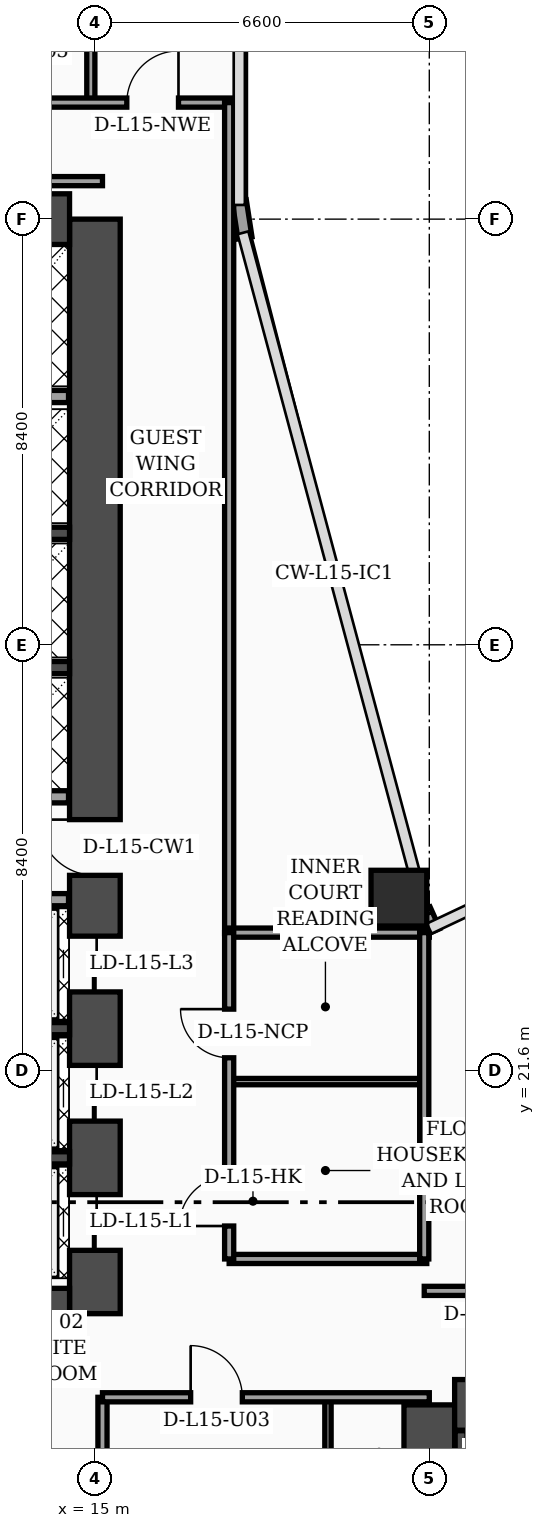
"""IFC4 building model, lengths in metres.
Left out: names, types, materials, properties, quantities, classifications, styles, units other than length and angle.
Written with IfcOpenShell. Run it as: python <this file> out.ifc"""

import sys

from ifc_helpers import new_model, si_unit, direction, frame, frame_2d, origin, origin_2d, place, context, subcontext, project, spatial, rectangle, hollow_rectangle, extrude, element, fill, save


model = new_model("IFC4")
c1 = context("Model", 3, precision=1e-05, world=origin(), true_north=direction((0.0, 1.0)))
c2 = subcontext(c1, "Body", "Model", "MODEL_VIEW")
j1 = project(units=[si_unit("LENGTHUNIT", "METRE"), si_unit("PLANEANGLEUNIT", "RADIAN")], contexts=[c1])
p1 = place(None, origin())
s1 = spatial("IfcSite", under=j1, at=p1, CompositionType="ELEMENT")
p2 = place(p1, origin())
s2 = spatial("IfcBuilding", under=s1, at=p2, CompositionType="ELEMENT")
p3 = place(p2, frame((0.0, 0.0, 66.0)))
s3 = spatial("IfcBuildingStorey", under=s2, at=p3, CompositionType="ELEMENT", Elevation=66.0)
p4 = place(p3, frame((15.0, 16.8, 0.0), z_axis=(0.0, 0.0, 1.0), x_axis=(0.0, 1.0, 0.0)))
e1 = element("IfcWall", 1, at=p4, inside=s3, PredefinedType="SHEAR", context=c2, shape_type="SweptSolid", body=[
    extrude(rectangle(XDim=21.6, YDim=1.0, at=frame_2d((10.8, 0.0))), origin(), (0.0, 0.0, 1.0), 3.56),
])
p5 = place(p4, frame((8.65, 0.0, 0.0)))
e2 = element("IfcOpeningElement", 2, at=p5, cuts=e1, PredefinedType="OPENING", context=c2, shape_type="SweptSolid", body=[
    extrude(rectangle(XDim=1.1, YDim=2.2, at=frame_2d((0.55, 1.1))), frame((0.0, 0.51, 0.0), z_axis=(0.0, -1.0, 0.0), x_axis=(1.0, 0.0, 0.0)), (0.0, 0.0, 1.0), 1.02),
])
p6 = place(p4, frame((1.25, 0.0, 0.0)))
e3 = element("IfcOpeningElement", 3, at=p6, cuts=e1, PredefinedType="OPENING", context=c2, shape_type="SweptSolid", body=[
    extrude(rectangle(XDim=1.1, YDim=2.2, at=frame_2d((0.55, 1.1))), frame((0.0, 0.51, 0.0), z_axis=(0.0, -1.0, 0.0), x_axis=(1.0, 0.0, 0.0)), (0.0, 0.0, 1.0), 1.02),
])
p7 = place(p4, frame((3.8, 0.0, 0.0)))
e4 = element("IfcOpeningElement", 4, at=p7, cuts=e1, PredefinedType="OPENING", context=c2, shape_type="SweptSolid", body=[
    extrude(rectangle(XDim=1.1, YDim=2.2, at=frame_2d((0.55, 1.1))), frame((0.0, 0.51, 0.0), z_axis=(0.0, -1.0, 0.0), x_axis=(1.0, 0.0, 0.0)), (0.0, 0.0, 1.0), 1.02),
])
p8 = place(p4, frame((6.35, 0.0, 0.0)))
e5 = element("IfcOpeningElement", 5, at=p8, cuts=e1, PredefinedType="OPENING", context=c2, shape_type="SweptSolid", body=[
    extrude(rectangle(XDim=1.1, YDim=2.2, at=frame_2d((0.55, 1.1))), frame((0.0, 0.51, 0.0), z_axis=(0.0, -1.0, 0.0), x_axis=(1.0, 0.0, 0.0)), (0.0, 0.0, 1.0), 1.02),
])
for number, where, z_axis, x_axis in (
    (6, (4.7, 38.4, 0.0), (0.0, 0.0, 1.0), (1.0, 0.0, 0.0)),
    (7, (4.7, 16.8, 0.0), (0.0, 0.0, 1.0), (1.0, 0.0, 0.0)),
):
    element("IfcWall", number, at=place(p3, frame(where, z_axis=z_axis, x_axis=x_axis)), inside=s3, PredefinedType="SHEAR", context=c2, shape_type="SweptSolid", body=[
        extrude(rectangle(XDim=9.8, YDim=1.0, at=frame_2d((4.9, 0.0))), origin(), (0.0, 0.0, 1.0), 3.56),
    ])
p9 = place(p3, frame((21.6, 4.6, 0.0), z_axis=(0.0, 0.0, 1.0), x_axis=(0.0, 1.0, 0.0)))
e8 = element("IfcWall", 8, at=p9, inside=s3, PredefinedType="SHEAR", context=c2, shape_type="SweptSolid", body=[
    extrude(rectangle(XDim=10.4, YDim=1.0, at=frame_2d((5.2, 0.0))), origin(), (0.0, 0.0, 1.0), 3.56),
])
p10 = place(p3, frame((22.1, 15.0, 0.0), z_axis=(0.0, 0.0, 1.0), x_axis=(1.0, 0.0, 0.0)))
e9 = element("IfcWall", 9, at=p10, inside=s3, PredefinedType="SHEAR", context=c2, shape_type="SweptSolid", body=[
    extrude(rectangle(XDim=9.8, YDim=1.0, at=frame_2d((4.9, 0.0))), origin(), (0.0, 0.0, 1.0), 3.56),
])
p11 = place(p10, frame((4.8, 0.0, 0.0)))
e10 = element("IfcOpeningElement", 10, at=p11, cuts=e9, PredefinedType="OPENING", context=c2, shape_type="SweptSolid", body=[
    extrude(rectangle(XDim=1.1, YDim=2.2, at=frame_2d((0.55, 1.1))), frame((0.0, 0.51, 0.0), z_axis=(0.0, -1.0, 0.0), x_axis=(1.0, 0.0, 0.0)), (0.0, 0.0, 1.0), 1.02),
])
p12 = place(p3, frame((22.23, 5.1, 0.0), z_axis=(0.0, 0.0, 1.0), x_axis=(0.0, 1.0, 0.0)))
e11 = element("IfcWall", 11, at=p12, inside=s3, PredefinedType="SOLIDWALL", context=c2, shape_type="SweptSolid", body=[
    extrude(rectangle(XDim=9.39, YDim=0.24, at=frame_2d((4.695, 0.0))), origin(), (0.0, 0.0, 1.0), 3.56),
])
for number, where, z_axis, x_axis in (
    (12, (12.18, 19.875, 0.0), (0.0, 0.0, 1.0), (1.0, 0.0, 0.0)),
    (13, (12.18, 22.425, 0.0), (0.0, 0.0, 1.0), (1.0, 0.0, 0.0)),
    (14, (12.18, 29.55, 0.0), (0.0, 0.0, 1.0), (1.0, 0.0, 0.0)),
    (15, (12.18, 32.2, 0.0), (0.0, 0.0, 1.0), (1.0, 0.0, 0.0)),
):
    element("IfcWall", number, at=place(p3, frame(where, z_axis=z_axis, x_axis=x_axis)), inside=s3, PredefinedType="SOLIDWALL", context=c2, shape_type="SweptSolid", body=[
        extrude(rectangle(XDim=2.32, YDim=0.24, at=frame_2d((1.16, 0.0))), origin(), (0.0, 0.0, 1.0), 3.56),
    ])
p13 = place(p3, frame((21.0, 25.0, 0.0), z_axis=(0.0, 0.0, 1.0), x_axis=(1.0, 0.0, 0.0)))
e16 = element("IfcColumn", 16, at=p13, inside=s3, PredefinedType="COLUMN", context=c2, shape_type="SweptSolid", body=[
    extrude(hollow_rectangle(XDim=1.1, YDim=1.1, WallThickness=0.045, at=origin_2d()), origin(), (0.0, 0.0, 1.0), 3.56),
])
p14 = place(p3, frame((21.68, 24.34, 0.0), z_axis=(0.0, 0.0, 1.0), x_axis=(-0.40758134973, 0.913168901875, 0.0)))
e17 = element("IfcWall", 17, at=p14, inside=s3, PredefinedType="SOLIDWALL", context=c2, shape_type="SweptSolid", body=[
    extrude(rectangle(XDim=0.471, YDim=0.28, at=frame_2d((0.235, 0.0))), origin(), (0.0, 0.0, 1.0), 3.56),
])
p15 = place(p3, frame((17.962, 38.03, 0.0), z_axis=(0.0, 0.0, 1.0), x_axis=(-0.15141125477, 0.988470855377, 0.0)))
e18 = element("IfcWall", 18, at=p15, inside=s3, PredefinedType="SOLIDWALL", context=c2, shape_type="SweptSolid", body=[
    extrude(rectangle(XDim=0.739, YDim=0.28, at=frame_2d((0.369, 0.0))), origin(), (0.0, 0.0, 1.0), 3.56),
])
p16 = place(p3, frame((12.15, 24.97, 0.0), z_axis=(0.0, 0.0, 1.0), x_axis=(1.0, 0.0, 0.0)))
e19 = element("IfcWall", 19, at=p16, inside=s3, PredefinedType="SOLIDWALL", context=c2, shape_type="SweptSolid", body=[
    extrude(rectangle(XDim=2.33, YDim=0.24, at=frame_2d((1.165, 0.0))), origin(), (0.0, 0.0, 1.0), 2.84),
])
p17 = place(p3, frame((12.25, 27.0, 0.0), z_axis=(0.0, 0.0, 1.0), x_axis=(1.0, 0.0, 0.0)))
e20 = element("IfcWall", 20, at=p17, inside=s3, PredefinedType="SOLIDWALL", context=c2, shape_type="SweptSolid", body=[
    extrude(rectangle(XDim=2.23, YDim=0.24, at=frame_2d((1.115, 0.0))), origin(), (0.0, 0.0, 1.0), 3.56),
])
p18 = place(p3, frame((9.66, 34.9, 0.0), z_axis=(0.0, 0.0, 1.0), x_axis=(1.0, 0.0, 0.0)))
e21 = element("IfcWall", 21, at=p18, inside=s3, PredefinedType="SOLIDWALL", context=c2, shape_type="SweptSolid", body=[
    extrude(rectangle(XDim=4.82, YDim=0.24, at=frame_2d((2.41, 0.0))), origin(), (0.0, 0.0, 1.0), 3.56),
])
p19 = place(p3, frame((15.15, 2.44, 0.0), z_axis=(0.0, 0.0, 1.0), x_axis=(0.0, 1.0, 0.0)))
e22 = element("IfcWall", 22, at=p19, inside=s3, PredefinedType="PARTITIONING", context=c2, shape_type="SweptSolid", body=[
    extrude(rectangle(XDim=12.71, YDim=0.18, at=frame_2d((6.355, 0.0))), origin(), (0.0, 0.0, 1.0), 3.04),
])
p20 = place(p3, frame((19.6, 2.44, 0.0), z_axis=(0.0, 0.0, 1.0), x_axis=(0.0, 1.0, 0.0)))
e23 = element("IfcWall", 23, at=p20, inside=s3, PredefinedType="PARTITIONING", context=c2, shape_type="SweptSolid", body=[
    extrude(rectangle(XDim=12.71, YDim=0.125, at=frame_2d((6.355, 0.0))), origin(), (0.0, 0.0, 1.0), 2.34),
])
p21 = place(p20, frame((4.34, 0.0, 0.0)))
e24 = element("IfcOpeningElement", 24, at=p21, cuts=e23, PredefinedType="OPENING", context=c2, shape_type="SweptSolid", body=[
    extrude(rectangle(XDim=0.96, YDim=2.2, at=frame_2d((0.48, 1.1))), frame((0.0, 0.073, 0.0), z_axis=(0.0, -1.0, 0.0), x_axis=(1.0, 0.0, 0.0)), (0.0, 0.0, 1.0), 0.145),
])
p22 = place(p20, frame((10.18, 0.0, 0.0)))
e25 = element("IfcOpeningElement", 25, at=p22, cuts=e23, PredefinedType="OPENING", context=c2, shape_type="SweptSolid", body=[
    extrude(rectangle(XDim=0.9, YDim=2.15, at=frame_2d((0.45, 1.075))), frame((0.0, 0.073, 0.0), z_axis=(0.0, -1.0, 0.0), x_axis=(1.0, 0.0, 0.0)), (0.0, 0.0, 1.0), 0.145),
])
p23 = place(p3, frame((15.15, 15.15, 0.0), z_axis=(0.0, 0.0, 1.0), x_axis=(1.0, 0.0, 0.0)))
e26 = element("IfcWall", 26, at=p23, inside=s3, PredefinedType="PARTITIONING", context=c2, shape_type="SweptSolid", body=[
    extrude(rectangle(XDim=6.45, YDim=0.18, at=frame_2d((3.225, 0.0))), origin(), (0.0, 0.0, 1.0), 2.34),
])
p24 = place(p23, frame((1.74, 0.0, 0.0)))
e27 = element("IfcOpeningElement", 27, at=p24, cuts=e26, PredefinedType="OPENING", context=c2, shape_type="SweptSolid", body=[
    extrude(rectangle(XDim=1.02, YDim=2.2, at=frame_2d((0.51, 1.1))), frame((0.0, 0.1, 0.0), z_axis=(0.0, -1.0, 0.0), x_axis=(1.0, 0.0, 0.0)), (0.0, 0.0, 1.0), 0.2),
])
p25 = place(p3, frame((14.92, 40.7, 0.0), z_axis=(0.0, 0.0, 1.0), x_axis=(0.0, 1.0, 0.0)))
e28 = element("IfcWall", 28, at=p25, inside=s3, PredefinedType="PARTITIONING", context=c2, shape_type="SweptSolid", body=[
    extrude(rectangle(XDim=7.1, YDim=0.16, at=frame_2d((3.55, 0.0))), origin(), (0.0, 0.0, 1.0), 3.04),
])
p26 = place(p3, frame((0.08, 40.7, 0.0), z_axis=(0.0, 0.0, 1.0), x_axis=(1.0, 0.0, 0.0)))
e29 = element("IfcWall", 29, at=p26, inside=s3, PredefinedType="PARTITIONING", context=c2, shape_type="SweptSolid", body=[
    extrude(rectangle(XDim=17.77, YDim=0.18, at=frame_2d((8.885, 0.0))), origin(), (0.0, 0.0, 1.0), 2.84),
])
p27 = place(p26, frame((0.9, 0.0, 0.0)))
e30 = element("IfcOpeningElement", 30, at=p27, cuts=e29, PredefinedType="OPENING", context=c2, shape_type="SweptSolid", body=[
    extrude(rectangle(XDim=1.02, YDim=2.2, at=frame_2d((0.51, 1.1))), frame((0.0, 0.1, 0.0), z_axis=(0.0, -1.0, 0.0), x_axis=(1.0, 0.0, 0.0)), (0.0, 0.0, 1.0), 0.2),
])
p28 = place(p26, frame((4.75, 0.0, 0.0)))
e31 = element("IfcOpeningElement", 31, at=p28, cuts=e29, PredefinedType="OPENING", context=c2, shape_type="SweptSolid", body=[
    extrude(rectangle(XDim=1.02, YDim=2.2, at=frame_2d((0.51, 1.1))), frame((0.0, 0.1, 0.0), z_axis=(0.0, -1.0, 0.0), x_axis=(1.0, 0.0, 0.0)), (0.0, 0.0, 1.0), 0.2),
])
p29 = place(p26, frame((10.63, 0.0, 0.0)))
e32 = element("IfcOpeningElement", 32, at=p29, cuts=e29, PredefinedType="OPENING", context=c2, shape_type="SweptSolid", body=[
    extrude(rectangle(XDim=1.02, YDim=2.2, at=frame_2d((0.51, 1.1))), frame((0.0, 0.1, 0.0), z_axis=(0.0, -1.0, 0.0), x_axis=(1.0, 0.0, 0.0)), (0.0, 0.0, 1.0), 0.2),
])
p30 = place(p26, frame((15.55, 0.0, 0.0)))
e33 = element("IfcOpeningElement", 33, at=p30, cuts=e29, PredefinedType="OPENING", context=c2, shape_type="SweptSolid", body=[
    extrude(rectangle(XDim=1.02, YDim=2.2, at=frame_2d((0.51, 1.1))), frame((0.0, 0.1, 0.0), z_axis=(0.0, -1.0, 0.0), x_axis=(1.0, 0.0, 0.0)), (0.0, 0.0, 1.0), 0.2),
])
p31 = place(p3, frame((17.65, 24.3, 0.0), z_axis=(0.0, 0.0, 1.0), x_axis=(0.0, 1.0, 0.0)))
e34 = element("IfcWall", 34, at=p31, inside=s3, PredefinedType="PARTITIONING", context=c2, shape_type="SweptSolid", body=[
    extrude(rectangle(XDim=16.4, YDim=0.18, at=frame_2d((8.2, 0.0))), origin(), (0.0, 0.0, 1.0), 2.84),
])
p32 = place(p3, frame((3.68, 39.15, 0.0), z_axis=(0.0, 0.0, 1.0), x_axis=(1.0, 0.0, 0.0)))
e35 = element("IfcWall", 35, at=p32, inside=s3, PredefinedType="PARTITIONING", context=c2, shape_type="SweptSolid", body=[
    extrude(rectangle(XDim=11.47, YDim=0.18, at=frame_2d((5.735, 0.0))), origin(), (0.0, 0.0, 1.0), 2.84),
])
p33 = place(p3, frame((17.65, 17.88, 0.0), z_axis=(0.0, 0.0, 1.0), x_axis=(1.0, 0.0, 0.0)))
e36 = element("IfcWall", 36, at=p33, inside=s3, PredefinedType="PARTITIONING", context=c2, shape_type="SweptSolid", body=[
    extrude(rectangle(XDim=3.9, YDim=0.18, at=frame_2d((1.95, 0.0))), origin(), (0.0, 0.0, 1.0), 3.56),
])
p34 = place(p3, frame((17.65, 21.38, 0.0), z_axis=(0.0, 0.0, 1.0), x_axis=(1.0, 0.0, 0.0)))
e37 = element("IfcWall", 37, at=p34, inside=s3, PredefinedType="PARTITIONING", context=c2, shape_type="SweptSolid", body=[
    extrude(rectangle(XDim=3.9, YDim=0.125, at=frame_2d((1.95, 0.0))), origin(), (0.0, 0.0, 1.0), 3.09),
])
p35 = place(p3, frame((17.65, 24.32, 0.0), z_axis=(0.0, 0.0, 1.0), x_axis=(1.0, 0.0, 0.0)))
e38 = element("IfcWall", 38, at=p35, inside=s3, PredefinedType="PARTITIONING", context=c2, shape_type="SweptSolid", body=[
    extrude(rectangle(XDim=3.95, YDim=0.18, at=frame_2d((1.975, 0.0))), origin(), (0.0, 0.0, 1.0), 3.56),
])
p36 = place(p3, frame((21.5, 17.88, 0.0), z_axis=(0.0, 0.0, 1.0), x_axis=(0.0, 1.0, 0.0)))
e39 = element("IfcWall", 39, at=p36, inside=s3, PredefinedType="PARTITIONING", context=c2, shape_type="SweptSolid", body=[
    extrude(rectangle(XDim=6.44, YDim=0.18, at=frame_2d((3.22, 0.0))), origin(), (0.0, 0.0, 1.0), 3.09),
])
p37 = place(p3, frame((17.65, 17.88, 0.0), z_axis=(0.0, 0.0, 1.0), x_axis=(0.0, 1.0, 0.0)))
e40 = element("IfcWall", 40, at=p37, inside=s3, PredefinedType="PARTITIONING", context=c2, shape_type="SweptSolid", body=[
    extrude(rectangle(XDim=6.44, YDim=0.18, at=frame_2d((3.22, 0.0))), origin(), (0.0, 0.0, 1.0), 3.09),
])
p38 = place(p37, frame((0.65, 0.0, 0.0)))
e41 = element("IfcOpeningElement", 41, at=p38, cuts=e40, PredefinedType="OPENING", context=c2, shape_type="SweptSolid", body=[
    extrude(rectangle(XDim=0.98, YDim=2.15, at=frame_2d((0.49, 1.075))), frame((0.0, 0.1, 0.0), z_axis=(0.0, -1.0, 0.0), x_axis=(1.0, 0.0, 0.0)), (0.0, 0.0, 1.0), 0.2),
])
p39 = place(p37, frame((3.97, 0.0, 0.0)))
e42 = element("IfcOpeningElement", 42, at=p39, cuts=e40, PredefinedType="OPENING", context=c2, shape_type="SweptSolid", body=[
    extrude(rectangle(XDim=0.96, YDim=2.2, at=frame_2d((0.48, 1.1))), frame((0.0, 0.1, 0.0), z_axis=(0.0, -1.0, 0.0), x_axis=(1.0, 0.0, 0.0)), (0.0, 0.0, 1.0), 0.2),
])
p40 = place(p3, frame((21.5, 17.25, 0.0), z_axis=(0.0, 0.0, 1.0), x_axis=(1.0, 0.0, 0.0)))
e43 = element("IfcWall", 43, at=p40, inside=s3, PredefinedType="PARTITIONING", context=c2, shape_type="SweptSolid", body=[
    extrude(rectangle(XDim=27.45, YDim=0.18, at=frame_2d((13.725, 0.0))), origin(), (0.0, 0.0, 1.0), 2.84),
])
p41 = place(p40, frame((0.95, 0.0, 0.0)))
e44 = element("IfcOpeningElement", 44, at=p41, cuts=e43, PredefinedType="OPENING", context=c2, shape_type="SweptSolid", body=[
    extrude(rectangle(XDim=1.02, YDim=2.2, at=frame_2d((0.51, 1.1))), frame((0.0, 0.1, 0.0), z_axis=(0.0, -1.0, 0.0), x_axis=(1.0, 0.0, 0.0)), (0.0, 0.0, 1.0), 0.2),
])
p42 = place(p40, frame((15.28, 0.0, 0.0)))
e45 = element("IfcOpeningElement", 45, at=p42, cuts=e43, PredefinedType="OPENING", context=c2, shape_type="SweptSolid", body=[
    extrude(rectangle(XDim=1.02, YDim=2.2, at=frame_2d((0.51, 1.1))), frame((0.0, 0.1, 0.0), z_axis=(0.0, -1.0, 0.0), x_axis=(1.0, 0.0, 0.0)), (0.0, 0.0, 1.0), 0.2),
])
p43 = place(p24, origin())
e46 = element("IfcDoor", 46, at=p43, inside=s3, OperationType="SINGLE_SWING_LEFT", PredefinedType="DOOR", context=c2, shape_type="SweptSolid", body=[
    extrude(rectangle(XDim=1.02, YDim=2.2, at=frame_2d((0.51, 1.1))), frame((0.0, 0.025, 0.0), z_axis=(0.0, -1.0, 0.0), x_axis=(1.0, 0.0, 0.0)), (0.0, 0.0, 1.0), 0.05),
])
fill(e27, e46)
p44 = place(p30, origin())
e47 = element("IfcDoor", 47, at=p44, inside=s3, OperationType="SINGLE_SWING_RIGHT", PredefinedType="DOOR", context=c2, shape_type="SweptSolid", body=[
    extrude(rectangle(XDim=1.02, YDim=2.2, at=frame_2d((0.51, 1.1))), frame((0.0, 0.025, 0.0), z_axis=(0.0, -1.0, 0.0), x_axis=(1.0, 0.0, 0.0)), (0.0, 0.0, 1.0), 0.05),
])
fill(e33, e47)
p45 = place(p38, origin())
e48 = element("IfcDoor", 48, at=p45, inside=s3, OperationType="SINGLE_SWING_LEFT", PredefinedType="DOOR", context=c2, shape_type="SweptSolid", body=[
    extrude(rectangle(XDim=0.98, YDim=2.15, at=frame_2d((0.49, 1.075))), frame((0.0, 0.025, 0.0), z_axis=(0.0, -1.0, 0.0), x_axis=(1.0, 0.0, 0.0)), (0.0, 0.0, 1.0), 0.05),
])
fill(e41, e48)
p46 = place(p39, origin())
e49 = element("IfcDoor", 49, at=p46, inside=s3, OperationType="SINGLE_SWING_RIGHT", PredefinedType="DOOR", context=c2, shape_type="SweptSolid", body=[
    extrude(rectangle(XDim=0.96, YDim=2.2, at=frame_2d((0.48, 1.1))), frame((0.0, 0.025, 0.0), z_axis=(0.0, -1.0, 0.0), x_axis=(1.0, 0.0, 0.0)), (0.0, 0.0, 1.0), 0.05),
])
fill(e42, e49)
p47 = place(p5, origin())
e50 = element("IfcDoor", 50, at=p47, inside=s3, OperationType="SINGLE_SWING_RIGHT", PredefinedType="DOOR", context=c2, shape_type="SweptSolid", body=[
    extrude(rectangle(XDim=1.1, YDim=2.2, at=frame_2d((0.55, 1.1))), frame((0.0, 0.025, 0.0), z_axis=(0.0, -1.0, 0.0), x_axis=(1.0, 0.0, 0.0)), (0.0, 0.0, 1.0), 0.05),
])
fill(e2, e50)
p48 = place(p6, origin())
e51 = element("IfcDoor", 51, at=p48, inside=s3, OperationType="DOUBLE_DOOR_SLIDING", PredefinedType="DOOR", context=c2, shape_type="SweptSolid", body=[
    extrude(rectangle(XDim=1.1, YDim=2.2, at=frame_2d((0.55, 1.1))), frame((0.0, 0.025, 0.0), z_axis=(0.0, -1.0, 0.0), x_axis=(1.0, 0.0, 0.0)), (0.0, 0.0, 1.0), 0.05),
])
fill(e3, e51)
p49 = place(p7, origin())
e52 = element("IfcDoor", 52, at=p49, inside=s3, OperationType="DOUBLE_DOOR_SLIDING", PredefinedType="DOOR", context=c2, shape_type="SweptSolid", body=[
    extrude(rectangle(XDim=1.1, YDim=2.2, at=frame_2d((0.55, 1.1))), frame((0.0, 0.025, 0.0), z_axis=(0.0, -1.0, 0.0), x_axis=(1.0, 0.0, 0.0)), (0.0, 0.0, 1.0), 0.05),
])
fill(e4, e52)
p50 = place(p8, origin())
e53 = element("IfcDoor", 53, at=p50, inside=s3, OperationType="DOUBLE_DOOR_SLIDING", PredefinedType="DOOR", context=c2, shape_type="SweptSolid", body=[
    extrude(rectangle(XDim=1.1, YDim=2.2, at=frame_2d((0.55, 1.1))), frame((0.0, 0.025, 0.0), z_axis=(0.0, -1.0, 0.0), x_axis=(1.0, 0.0, 0.0)), (0.0, 0.0, 1.0), 0.05),
])
fill(e5, e53)
save(model, sys.argv[1])
